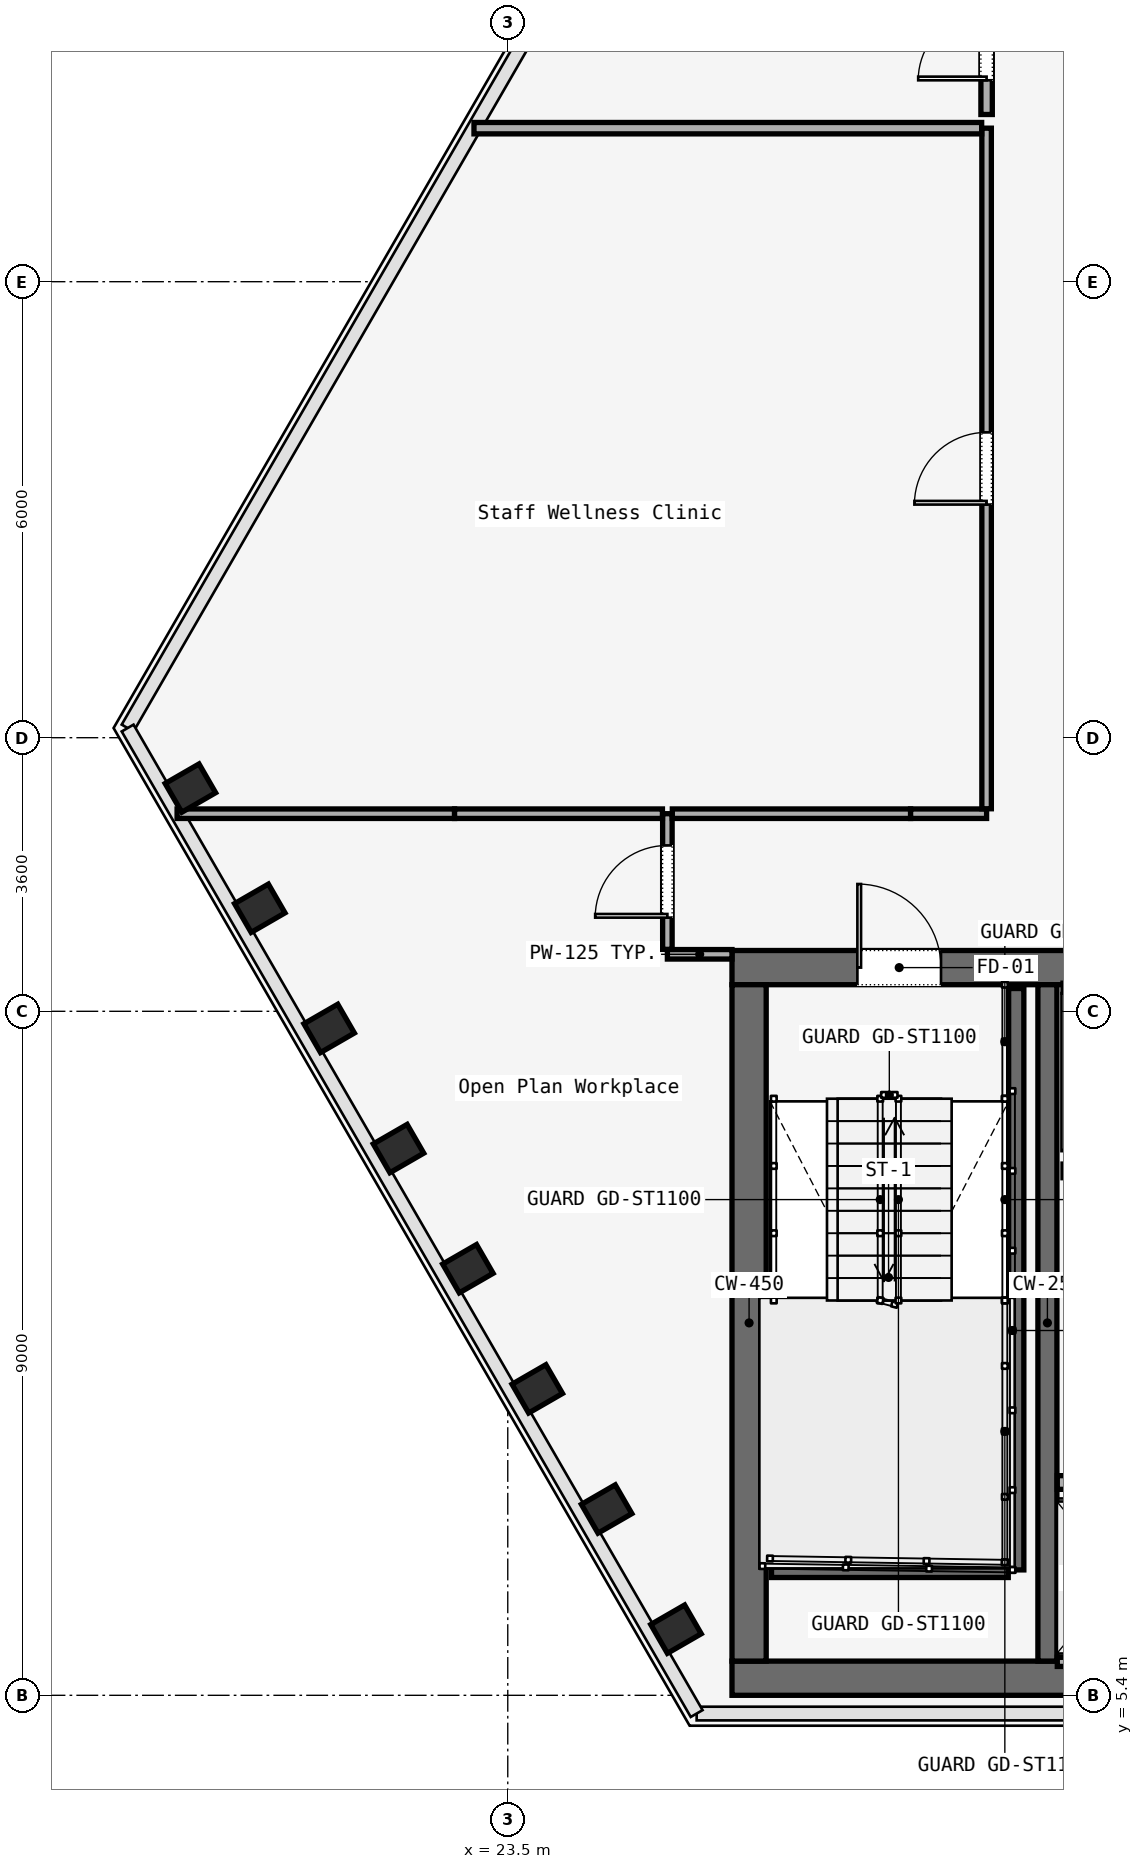
"""IFC4 building model, lengths in metres.
Left out: names, types, materials, properties, quantities, classifications, styles, units other than length and angle.
Written with IfcOpenShell. Run it as: python <this file> out.ifc"""

import sys

from ifc_helpers import new_model, si_unit, direction, frame, frame_2d, origin, origin_2d, place, context, subcontext, project, spatial, rectangle, i_section, extrude, element, fill, save


model = new_model("IFC4")
c1 = context("Model", 3, precision=1e-05, world=origin(), true_north=direction((0.0, 1.0)))
c2 = subcontext(c1, "Body", "Model", "MODEL_VIEW")
j1 = project(units=[si_unit("LENGTHUNIT", "METRE"), si_unit("PLANEANGLEUNIT", "RADIAN")], contexts=[c1])
p1 = place(None, origin())
s1 = spatial("IfcSite", under=j1, at=p1, CompositionType="ELEMENT")
p2 = place(p1, origin())
s2 = spatial("IfcBuilding", under=s1, at=p2, CompositionType="ELEMENT")
p3 = place(p2, frame((0.0, 0.0, 74.0)))
s3 = spatial("IfcBuildingStorey", under=s2, at=p3, CompositionType="ELEMENT", Elevation=74.0)
p4 = place(p3, frame((26.45, 14.975, 0.0), z_axis=(0.0, 0.0, 1.0), x_axis=(1.0, 0.0, 0.0)))
e1 = element("IfcWall", 1, at=p4, inside=s3, PredefinedType="SOLIDWALL", context=c2, shape_type="SweptSolid", body=[
    extrude(rectangle(XDim=31.1, YDim=0.45, at=frame_2d((15.55, 0.0))), origin(), (0.0, 0.0, 1.0), 3.58),
])
p5 = place(p4, frame((1.65, 0.0, 0.0)))
e2 = element("IfcOpeningElement", 2, at=p5, cuts=e1, PredefinedType="OPENING", context=c2, shape_type="SweptSolid", body=[
    extrude(rectangle(XDim=1.1, YDim=2.2, at=frame_2d((0.55, 1.1))), frame((0.0, 0.225, 0.0), z_axis=(0.0, -1.0, 0.0), x_axis=(1.0, 0.0, 0.0)), (0.0, 0.0, 1.0), 0.45),
])
p6 = place(p4, frame((13.65, 0.0, 0.0)))
e3 = element("IfcOpeningElement", 3, at=p6, cuts=e1, PredefinedType="OPENING", context=c2, shape_type="SweptSolid", body=[
    extrude(rectangle(XDim=1.1, YDim=2.2, at=frame_2d((0.55, 1.1))), frame((0.0, 0.225, 0.0), z_axis=(0.0, -1.0, 0.0), x_axis=(1.0, 0.0, 0.0)), (0.0, 0.0, 1.0), 0.45),
])
p7 = place(p4, frame((25.55, 0.0, 0.0)))
e4 = element("IfcOpeningElement", 4, at=p7, cuts=e1, PredefinedType="OPENING", context=c2, shape_type="SweptSolid", body=[
    extrude(rectangle(XDim=1.1, YDim=2.2, at=frame_2d((0.55, 1.1))), frame((0.0, 0.225, 0.0), z_axis=(0.0, -1.0, 0.0), x_axis=(1.0, 0.0, 0.0)), (0.0, 0.0, 1.0), 0.45),
])
p8 = place(p4, frame((10.7, 0.0, 0.0)))
e5 = element("IfcOpeningElement", 5, at=p8, cuts=e1, PredefinedType="OPENING", context=c2, shape_type="SweptSolid", body=[
    extrude(rectangle(XDim=1.4, YDim=2.2, at=frame_2d((0.7, 1.1))), frame((0.0, 0.225, 0.0), z_axis=(0.0, -1.0, 0.0), x_axis=(1.0, 0.0, 0.0)), (0.0, 0.0, 1.0), 0.45),
])
p9 = place(p4, frame((19.35, 0.0, 0.0)))
e6 = element("IfcOpeningElement", 6, at=p9, cuts=e1, PredefinedType="OPENING", context=c2, shape_type="SweptSolid", body=[
    extrude(rectangle(XDim=1.1, YDim=2.2, at=frame_2d((0.55, 1.1))), frame((0.0, 0.225, 0.0), z_axis=(0.0, -1.0, 0.0), x_axis=(1.0, 0.0, 0.0)), (0.0, 0.0, 1.0), 0.45),
])
p10 = place(p4, frame((21.4, 0.0, 0.0)))
e7 = element("IfcOpeningElement", 7, at=p10, cuts=e1, PredefinedType="OPENING", context=c2, shape_type="SweptSolid", body=[
    extrude(rectangle(XDim=0.9, YDim=2.1, at=frame_2d((0.45, 1.05))), frame((0.0, 0.225, 0.0), z_axis=(0.0, -1.0, 0.0), x_axis=(1.0, 0.0, 0.0)), (0.0, 0.0, 1.0), 0.45),
])
p11 = place(p4, frame((23.35, 0.0, 0.0)))
e8 = element("IfcOpeningElement", 8, at=p11, cuts=e1, PredefinedType="OPENING", context=c2, shape_type="SweptSolid", body=[
    extrude(rectangle(XDim=1.3, YDim=2.3, at=frame_2d((0.65, 1.15))), frame((0.0, 0.225, 0.0), z_axis=(0.0, -1.0, 0.0), x_axis=(1.0, 0.0, 0.0)), (0.0, 0.0, 1.0), 0.45),
])
p12 = place(p3, frame((26.45, 5.625, 0.0), z_axis=(0.0, 0.0, 1.0), x_axis=(1.0, 0.0, 0.0)))
e9 = element("IfcWall", 9, at=p12, inside=s3, PredefinedType="SOLIDWALL", context=c2, shape_type="SweptSolid", body=[
    extrude(rectangle(XDim=31.1, YDim=0.45, at=frame_2d((15.55, 0.0))), origin(), (0.0, 0.0, 1.0), 3.58),
])
p13 = place(p3, frame((26.675, 5.85, 0.0), z_axis=(0.0, 0.0, 1.0), x_axis=(0.0, 1.0, 0.0)))
e10 = element("IfcWall", 10, at=p13, inside=s3, PredefinedType="SOLIDWALL", context=c2, shape_type="SweptSolid", body=[
    extrude(rectangle(XDim=8.9, YDim=0.45, at=frame_2d((4.45, 0.0))), origin(), (0.0, 0.0, 1.0), 3.58),
])
p14 = place(p3, frame((30.6, 5.85, 0.0), z_axis=(0.0, 0.0, 1.0), x_axis=(0.0, 1.0, 0.0)))
e11 = element("IfcWall", 11, at=p14, inside=s3, PredefinedType="SOLIDWALL", context=c2, shape_type="SweptSolid", body=[
    extrude(rectangle(XDim=8.9, YDim=0.25, at=frame_2d((4.45, 0.0))), origin(), (0.0, 0.0, 1.0), 3.58),
])
for number, where, z_axis, x_axis in (
    (12, (19.324, 17.337, 0.0), (0.0, 0.0, 1.0), (-0.5, 0.866, 0.0)),
    (13, (20.237, 15.756, 0.0), (0.0, 0.0, 1.0), (-0.5, 0.866, 0.0)),
    (14, (21.15, 14.175, 0.0), (0.0, 0.0, 1.0), (-0.5, 0.866, 0.0)),
    (15, (22.062, 12.594, 0.0), (0.0, 0.0, 1.0), (-0.5, 0.866, 0.0)),
    (16, (22.975, 11.013, 0.0), (0.0, 0.0, 1.0), (-0.5, 0.866, 0.0)),
    (17, (23.888, 9.432, 0.0), (0.0, 0.0, 1.0), (-0.5, 0.866, 0.0)),
    (18, (24.801, 7.851, 0.0), (0.0, 0.0, 1.0), (-0.5, 0.866, 0.0)),
    (19, (25.713, 6.271, 0.0), (0.0, 0.0, 1.0), (-0.5, 0.866, 0.0)),
):
    element("IfcColumn", number, at=place(p3, frame(where, z_axis=z_axis, x_axis=x_axis)), inside=s3, PredefinedType="COLUMN", context=c2, shape_type="SweptSolid", body=[
        extrude(i_section(OverallWidth=0.437, OverallDepth=0.514, WebThickness=0.061, FlangeThickness=0.077, FilletRadius=0.015, at=origin_2d()), origin(), (0.0, 0.0, 1.0), 3.58),
    ])
p15 = place(p3, frame((30.19, 14.7, 0.0), z_axis=(0.0, 0.0, 1.0), x_axis=(0.0, -1.0, 0.0)))
e20 = element("IfcWall", 20, at=p15, inside=s3, PredefinedType="SOLIDWALL", context=c2, shape_type="SweptSolid", body=[
    extrude(rectangle(XDim=7.65, YDim=0.2, at=frame_2d((3.825, 0.0))), origin(), (0.0, 0.0, 1.0), 3.8),
])
p16 = place(p3, frame((26.97, 7.05, 0.0), z_axis=(0.0, 0.0, 1.0), x_axis=(1.0, 0.0, 0.0)))
e21 = element("IfcWall", 21, at=p16, inside=s3, PredefinedType="SOLIDWALL", context=c2, shape_type="SweptSolid", body=[
    extrude(rectangle(XDim=3.115, YDim=0.2, at=frame_2d((1.558, 0.0))), origin(), (0.0, 0.0, 1.0), 3.8),
])
p17 = place(p3, frame((30.73, 8.2, 0.0), z_axis=(0.0, 0.0, 1.0), x_axis=(1.0, 0.0, 0.0)))
e22 = element("IfcWall", 22, at=p17, inside=s3, PredefinedType="SOLIDWALL", context=c2, shape_type="SweptSolid", body=[
    extrude(rectangle(XDim=1.665, YDim=0.18, at=frame_2d((0.833, 0.0))), origin(), (0.0, 0.0, 1.0), 2.95),
])
p18 = place(p17, frame((0.282, 0.0, 0.0)))
e23 = element("IfcOpeningElement", 23, at=p18, cuts=e22, PredefinedType="OPENING", context=c2, shape_type="SweptSolid", body=[
    extrude(rectangle(XDim=1.1, YDim=2.2, at=frame_2d((0.55, 1.1))), frame((0.0, 0.09, 0.0), z_axis=(0.0, -1.0, 0.0), x_axis=(1.0, 0.0, 0.0)), (0.0, 0.0, 1.0), 0.18),
])
p19 = place(p3, frame((30.73, 5.84, 0.0), z_axis=(0.0, 0.0, 1.0), x_axis=(1.0, 0.0, 0.0)))
e24 = element("IfcWall", 24, at=p19, inside=s3, PredefinedType="SOLIDWALL", context=c2, shape_type="SweptSolid", body=[
    extrude(rectangle(XDim=1.665, YDim=0.12, at=frame_2d((0.833, 0.0))), origin(), (0.0, 0.0, 1.0), 2.95),
])
p20 = place(p3, frame((26.45, 15.15, 0.0), z_axis=(0.0, 0.0, 1.0), x_axis=(-1.0, 0.0, 0.0)))
e25 = element("IfcWall", 25, at=p20, inside=s3, PredefinedType="PARTITIONING", context=c2, shape_type="SweptSolid", body=[
    extrude(rectangle(XDim=0.85, YDim=0.125, at=frame_2d((0.425, 0.0))), origin(), (0.0, 0.0, 1.0), 2.95),
])
p21 = place(p3, frame((25.6, 15.215, 0.0), z_axis=(0.0, 0.0, 1.0), x_axis=(0.0, 1.0, 0.0)))
e26 = element("IfcWall", 26, at=p21, inside=s3, PredefinedType="PARTITIONING", context=c2, shape_type="SweptSolid", body=[
    extrude(rectangle(XDim=1.785, YDim=0.125, at=frame_2d((0.893, 0.0))), origin(), (0.0, 0.0, 1.0), 2.95),
])
p22 = place(p21, frame((0.417, 0.0, 0.0)))
e27 = element("IfcOpeningElement", 27, at=p22, cuts=e26, PredefinedType="OPENING", context=c2, shape_type="SweptSolid", body=[
    extrude(rectangle(XDim=0.95, YDim=2.2, at=frame_2d((0.475, 1.1))), frame((0.0, 0.062, 0.0), z_axis=(0.0, -1.0, 0.0), x_axis=(1.0, 0.0, 0.0)), (0.0, 0.0, 1.0), 0.125),
])
p23 = place(p3, frame((25.665, 17.0, 0.0), z_axis=(0.0, 0.0, 1.0), x_axis=(1.0, 0.0, 0.0)))
e28 = element("IfcWall", 28, at=p23, inside=s3, PredefinedType="PARTITIONING", context=c2, shape_type="SweptSolid", body=[
    extrude(rectangle(XDim=3.135, YDim=0.125, at=frame_2d((1.567, 0.0))), origin(), (0.0, 0.0, 1.0), 2.95),
])
p24 = place(p3, frame((28.8, 17.0, 0.0), z_axis=(0.0, 0.0, 1.0), x_axis=(1.0, 0.0, 0.0)))
e29 = element("IfcWall", 29, at=p24, inside=s3, PredefinedType="PARTITIONING", context=c2, shape_type="SweptSolid", body=[
    extrude(rectangle(XDim=1.0, YDim=0.125, at=frame_2d((0.5, 0.0))), origin(), (0.0, 0.0, 1.0), 2.95),
])
p25 = place(p3, frame((29.8, 17.065, 0.0), z_axis=(0.0, 0.0, 1.0), x_axis=(0.0, 1.0, 0.0)))
e30 = element("IfcWall", 30, at=p25, inside=s3, PredefinedType="PARTITIONING", context=c2, shape_type="SweptSolid", body=[
    extrude(rectangle(XDim=8.955, YDim=0.125, at=frame_2d((4.478, 0.0))), origin(), (0.0, 0.0, 1.0), 2.95),
])
p26 = place(p25, frame((4.002, 0.0, 0.0)))
e31 = element("IfcOpeningElement", 31, at=p26, cuts=e30, PredefinedType="OPENING", context=c2, shape_type="SweptSolid", body=[
    extrude(rectangle(XDim=0.95, YDim=2.2, at=frame_2d((0.475, 1.1))), frame((0.0, 0.062, 0.0), z_axis=(0.0, -1.0, 0.0), x_axis=(1.0, 0.0, 0.0)), (0.0, 0.0, 1.0), 0.125),
])
p27 = place(p3, frame((29.8, 26.2, 0.0), z_axis=(0.0, 0.0, 1.0), x_axis=(0.0, 1.0, 0.0)))
e32 = element("IfcWall", 32, at=p27, inside=s3, PredefinedType="PARTITIONING", context=c2, shape_type="SweptSolid", body=[
    extrude(rectangle(XDim=1.8, YDim=0.15, at=frame_2d((0.9, 0.0))), origin(), (0.0, 0.0, 1.0), 2.95),
])
p28 = place(p27, frame((0.45, 0.0, 0.0)))
e33 = element("IfcOpeningElement", 33, at=p28, cuts=e32, PredefinedType="OPENING", context=c2, shape_type="SweptSolid", body=[
    extrude(rectangle(XDim=0.9, YDim=2.15, at=frame_2d((0.45, 1.075))), frame((0.0, 0.075, 0.0), z_axis=(0.0, -1.0, 0.0), x_axis=(1.0, 0.0, 0.0)), (0.0, 0.0, 1.0), 0.15),
])
p29 = place(p3, frame((19.149, 17.0, 0.0), z_axis=(0.0, 0.0, 1.0), x_axis=(1.0, 0.0, 0.0)))
e34 = element("IfcWall", 34, at=p29, inside=s3, PredefinedType="PARTITIONING", context=c2, shape_type="SweptSolid", body=[
    extrude(rectangle(XDim=3.651, YDim=0.125, at=frame_2d((1.825, 0.0))), origin(), (0.0, 0.0, 1.0), 2.95),
])
p30 = place(p3, frame((22.8, 17.0, 0.0), z_axis=(0.0, 0.0, 1.0), x_axis=(1.0, 0.0, 0.0)))
e35 = element("IfcWall", 35, at=p30, inside=s3, PredefinedType="PARTITIONING", context=c2, shape_type="SweptSolid", body=[
    extrude(rectangle(XDim=2.735, YDim=0.125, at=frame_2d((1.367, 0.0))), origin(), (0.0, 0.0, 1.0), 2.95),
])
p31 = place(p3, frame((23.055, 26.02, 0.0), z_axis=(0.0, 0.0, 1.0), x_axis=(1.0, 0.0, 0.0)))
e36 = element("IfcWall", 36, at=p31, inside=s3, PredefinedType="PARTITIONING", context=c2, shape_type="SweptSolid", body=[
    extrude(rectangle(XDim=6.68, YDim=0.15, at=frame_2d((3.34, 0.0))), origin(), (0.0, 0.0, 1.0), 2.95),
])
p32 = place(p5, origin())
e37 = element("IfcDoor", 37, at=p32, inside=s3, OperationType="SINGLE_SWING_LEFT", PredefinedType="DOOR", context=c2, shape_type="SweptSolid", body=[
    extrude(rectangle(XDim=1.1, YDim=2.2, at=frame_2d((0.55, 1.1))), frame((0.0, 0.025, 0.0), z_axis=(0.0, -1.0, 0.0), x_axis=(1.0, 0.0, 0.0)), (0.0, 0.0, 1.0), 0.05),
])
fill(e2, e37)
p33 = place(p22, origin())
e38 = element("IfcDoor", 38, at=p33, inside=s3, OperationType="SINGLE_SWING_LEFT", PredefinedType="DOOR", context=c2, shape_type="SweptSolid", body=[
    extrude(rectangle(XDim=0.95, YDim=2.2, at=frame_2d((0.475, 1.1))), frame((0.0, 0.025, 0.0), z_axis=(0.0, -1.0, 0.0), x_axis=(1.0, 0.0, 0.0)), (0.0, 0.0, 1.0), 0.05),
])
fill(e27, e38)
p34 = place(p26, origin())
e39 = element("IfcDoor", 39, at=p34, inside=s3, OperationType="SINGLE_SWING_LEFT", PredefinedType="DOOR", context=c2, shape_type="SweptSolid", body=[
    extrude(rectangle(XDim=0.95, YDim=2.2, at=frame_2d((0.475, 1.1))), frame((0.0, 0.025, 0.0), z_axis=(0.0, -1.0, 0.0), x_axis=(1.0, 0.0, 0.0)), (0.0, 0.0, 1.0), 0.05),
])
fill(e31, e39)
p35 = place(p28, origin())
e40 = element("IfcDoor", 40, at=p35, inside=s3, OperationType="SINGLE_SWING_RIGHT", PredefinedType="DOOR", context=c2, shape_type="SweptSolid", body=[
    extrude(rectangle(XDim=0.9, YDim=2.15, at=frame_2d((0.45, 1.075))), frame((0.0, 0.025, 0.0), z_axis=(0.0, -1.0, 0.0), x_axis=(1.0, 0.0, 0.0)), (0.0, 0.0, 1.0), 0.05),
])
fill(e33, e40)
save(model, sys.argv[1])
